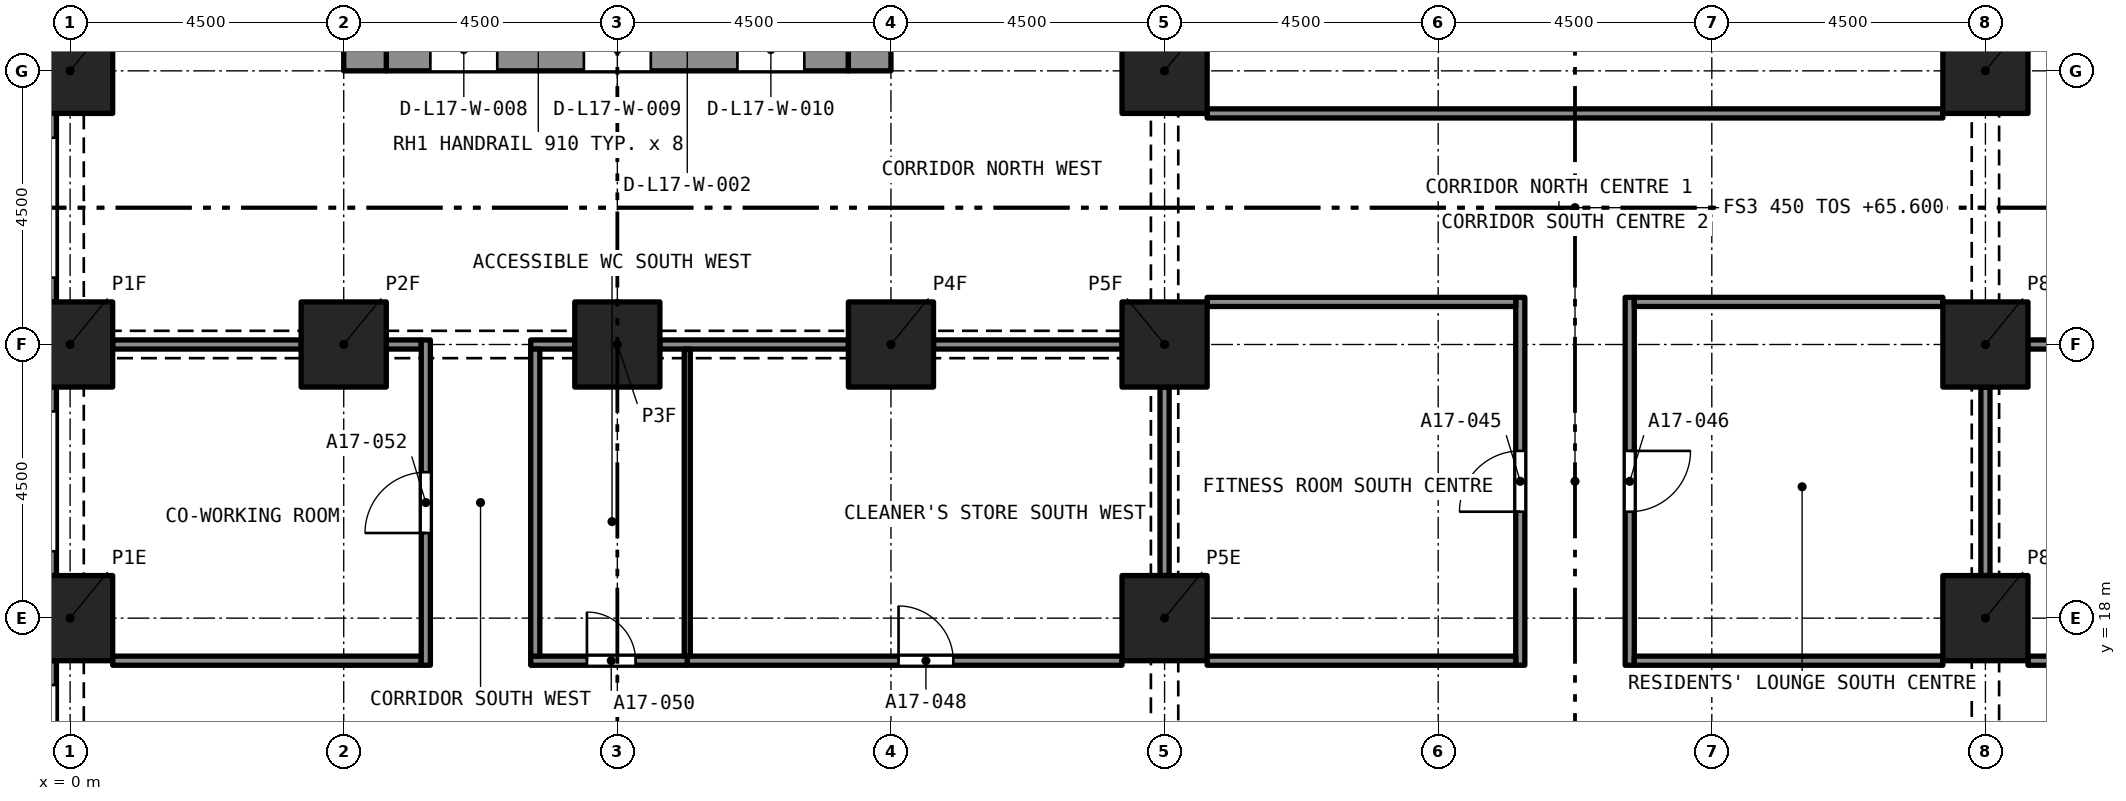
"""IFC4 building model, lengths in metres.
Left out: names, types, materials, properties, quantities, classifications, styles, units other than length and angle.
Written with IfcOpenShell. Run it as: python <this file> out.ifc"""

import sys

from ifc_helpers import new_model, si_unit, direction, frame, frame_2d, origin, origin_2d, place, context, subcontext, project, spatial, rectangle, extrude, element, fill, save


model = new_model("IFC4")
c1 = context("Model", 3, precision=1e-05, world=origin(), true_north=direction((0.0, 1.0)))
c2 = subcontext(c1, "Body", "Model", "MODEL_VIEW")
j1 = project(units=[si_unit("LENGTHUNIT", "METRE"), si_unit("PLANEANGLEUNIT", "RADIAN")], contexts=[c1])
p1 = place(None, origin())
s1 = spatial("IfcSite", under=j1, at=p1, CompositionType="ELEMENT")
p2 = place(p1, origin())
s2 = spatial("IfcBuilding", under=s1, at=p2, CompositionType="ELEMENT")
p3 = place(p2, frame((0.0, 0.0, 65.6)))
s3 = spatial("IfcBuildingStorey", under=s2, at=p3, CompositionType="ELEMENT", Elevation=65.6)
for number, where, z_axis, x_axis in (
    (1, (0.0, 18.0, 0.0), (0.0, 0.0, 1.0), (1.0, 0.0, 0.0)),
    (2, (18.0, 18.0, 0.0), (0.0, 0.0, 1.0), (1.0, 0.0, 0.0)),
    (3, (31.5, 18.0, 0.0), (0.0, 0.0, 1.0), (1.0, 0.0, 0.0)),
    (4, (0.0, 22.5, 0.0), (0.0, 0.0, 1.0), (1.0, 0.0, 0.0)),
    (5, (4.5, 22.5, 0.0), (0.0, 0.0, 1.0), (1.0, 0.0, 0.0)),
    (6, (9.0, 22.5, 0.0), (0.0, 0.0, 1.0), (1.0, 0.0, 0.0)),
    (7, (13.5, 22.5, 0.0), (0.0, 0.0, 1.0), (1.0, 0.0, 0.0)),
    (8, (18.0, 22.5, 0.0), (0.0, 0.0, 1.0), (1.0, 0.0, 0.0)),
    (9, (31.5, 22.5, 0.0), (0.0, 0.0, 1.0), (1.0, 0.0, 0.0)),
    (10, (0.0, 27.0, 0.0), (0.0, 0.0, 1.0), (1.0, 0.0, 0.0)),
    (11, (18.0, 27.0, 0.0), (0.0, 0.0, 1.0), (1.0, 0.0, 0.0)),
    (12, (31.5, 27.0, 0.0), (0.0, 0.0, 1.0), (1.0, 0.0, 0.0)),
):
    element("IfcColumn", number, at=place(p3, frame(where, z_axis=z_axis, x_axis=x_axis)), inside=s3, PredefinedType="COLUMN", context=c2, shape_type="SweptSolid", body=[
        extrude(rectangle(XDim=1.4, YDim=1.4, at=origin_2d()), origin(), (0.0, 0.0, 1.0), 3.2),
    ])
p4 = place(p3, frame((5.2, 27.35, 0.0), z_axis=(0.0, 0.0, 1.0), x_axis=(1.0, 0.0, 0.0)))
e13 = element("IfcWall", 13, at=p4, inside=s3, PredefinedType="SOLIDWALL", context=c2, shape_type="SweptSolid", body=[
    extrude(rectangle(XDim=7.6, YDim=0.7, at=frame_2d((3.8, 0.0))), origin(), (0.0, 0.0, 1.0), 3.2),
])
p5 = place(p4, frame((0.725, 0.0, 0.0)))
e14 = element("IfcOpeningElement", 14, at=p5, cuts=e13, PredefinedType="OPENING", context=c2, shape_type="SweptSolid", body=[
    extrude(rectangle(XDim=1.1, YDim=2.1, at=frame_2d((0.55, 1.05))), frame((0.0, 0.36, 0.0), z_axis=(0.0, -1.0, 0.0), x_axis=(1.0, 0.0, 0.0)), (0.0, 0.0, 1.0), 0.72),
])
p6 = place(p4, frame((3.25, 0.0, 0.0)))
e15 = element("IfcOpeningElement", 15, at=p6, cuts=e13, PredefinedType="OPENING", context=c2, shape_type="SweptSolid", body=[
    extrude(rectangle(XDim=1.1, YDim=2.1, at=frame_2d((0.55, 1.05))), frame((0.0, 0.36, 0.0), z_axis=(0.0, -1.0, 0.0), x_axis=(1.0, 0.0, 0.0)), (0.0, 0.0, 1.0), 0.72),
])
p7 = place(p4, frame((5.775, 0.0, 0.0)))
e16 = element("IfcOpeningElement", 16, at=p7, cuts=e13, PredefinedType="OPENING", context=c2, shape_type="SweptSolid", body=[
    extrude(rectangle(XDim=1.1, YDim=2.1, at=frame_2d((0.55, 1.05))), frame((0.0, 0.36, 0.0), z_axis=(0.0, -1.0, 0.0), x_axis=(1.0, 0.0, 0.0)), (0.0, 0.0, 1.0), 0.72),
])
p8 = place(p3, frame((4.85, 27.0, 0.0), z_axis=(0.0, 0.0, 1.0), x_axis=(0.0, 1.0, 0.0)))
e17 = element("IfcWall", 17, at=p8, inside=s3, PredefinedType="SOLIDWALL", context=c2, shape_type="SweptSolid", body=[
    extrude(rectangle(XDim=13.5, YDim=0.7, at=frame_2d((6.75, 0.0))), origin(), (0.0, 0.0, 1.0), 3.2),
])
p9 = place(p8, frame((8.95, 0.0, 0.0)))
e18 = element("IfcOpeningElement", 18, at=p9, cuts=e17, PredefinedType="OPENING", context=c2, shape_type="SweptSolid", body=[
    extrude(rectangle(XDim=1.2, YDim=2.1, at=frame_2d((0.6, 1.05))), frame((0.0, 0.36, 0.0), z_axis=(0.0, -1.0, 0.0), x_axis=(1.0, 0.0, 0.0)), (0.0, 0.0, 1.0), 0.72),
])
p10 = place(p3, frame((13.15, 27.0, 0.0), z_axis=(0.0, 0.0, 1.0), x_axis=(0.0, 1.0, 0.0)))
e19 = element("IfcWall", 19, at=p10, inside=s3, PredefinedType="SOLIDWALL", context=c2, shape_type="SweptSolid", body=[
    extrude(rectangle(XDim=13.5, YDim=0.7, at=frame_2d((6.75, 0.0))), origin(), (0.0, 0.0, 1.0), 3.2),
])
p11 = place(p10, frame((11.1, 0.0, 0.0)))
e20 = element("IfcOpeningElement", 20, at=p11, cuts=e19, PredefinedType="OPENING", context=c2, shape_type="SweptSolid", body=[
    extrude(rectangle(XDim=1.1, YDim=2.1, at=frame_2d((0.55, 1.05))), frame((0.0, 0.36, 0.0), z_axis=(0.0, -1.0, 0.0), x_axis=(1.0, 0.0, 0.0)), (0.0, 0.0, 1.0), 0.72),
])
p12 = place(p10, frame((8.95, 0.0, 0.0)))
e21 = element("IfcOpeningElement", 21, at=p12, cuts=e19, PredefinedType="OPENING", context=c2, shape_type="SweptSolid", body=[
    extrude(rectangle(XDim=1.2, YDim=2.1, at=frame_2d((0.6, 1.05))), frame((0.0, 0.36, 0.0), z_axis=(0.0, -1.0, 0.0), x_axis=(1.0, 0.0, 0.0)), (0.0, 0.0, 1.0), 0.72),
])
p13 = place(p3, frame((-0.375, 23.2, 0.0), z_axis=(0.0, 0.0, 1.0), x_axis=(0.0, 1.0, 0.0)))
e22 = element("IfcWall", 22, at=p13, inside=s3, PredefinedType="SOLIDWALL", context=c2, shape_type="SweptSolid", body=[
    extrude(rectangle(XDim=3.1, YDim=0.3, at=frame_2d((1.55, 0.0))), origin(), (0.0, 0.0, 1.0), 3.2),
])
p14 = place(p13, frame((0.4, 0.0, 0.45)))
e23 = element("IfcOpeningElement", 23, at=p14, cuts=e22, PredefinedType="OPENING", context=c2, shape_type="SweptSolid", body=[
    extrude(rectangle(XDim=2.3, YDim=1.95, at=frame_2d((1.15, 0.975))), frame((0.0, 0.16, 0.0), z_axis=(0.0, -1.0, 0.0), x_axis=(1.0, 0.0, 0.0)), (0.0, 0.0, 1.0), 0.32),
])
p15 = place(p3, frame((-0.375, 18.7, 0.0), z_axis=(0.0, 0.0, 1.0), x_axis=(0.0, 1.0, 0.0)))
e24 = element("IfcWall", 24, at=p15, inside=s3, PredefinedType="SOLIDWALL", context=c2, shape_type="SweptSolid", body=[
    extrude(rectangle(XDim=3.1, YDim=0.3, at=frame_2d((1.55, 0.0))), origin(), (0.0, 0.0, 1.0), 3.2),
])
p16 = place(p15, frame((0.4, 0.0, 0.45)))
e25 = element("IfcOpeningElement", 25, at=p16, cuts=e24, PredefinedType="OPENING", context=c2, shape_type="SweptSolid", body=[
    extrude(rectangle(XDim=2.3, YDim=1.95, at=frame_2d((1.15, 0.975))), frame((0.0, 0.16, 0.0), z_axis=(0.0, -1.0, 0.0), x_axis=(1.0, 0.0, 0.0)), (0.0, 0.0, 1.0), 0.32),
])
p17 = place(p3, frame((-0.375, 14.2, 0.0), z_axis=(0.0, 0.0, 1.0), x_axis=(0.0, 1.0, 0.0)))
e26 = element("IfcWall", 26, at=p17, inside=s3, PredefinedType="SOLIDWALL", context=c2, shape_type="SweptSolid", body=[
    extrude(rectangle(XDim=3.1, YDim=0.3, at=frame_2d((1.55, 0.0))), origin(), (0.0, 0.0, 1.0), 3.2),
])
p18 = place(p17, frame((0.4, 0.0, 0.45)))
e27 = element("IfcOpeningElement", 27, at=p18, cuts=e26, PredefinedType="OPENING", context=c2, shape_type="SweptSolid", body=[
    extrude(rectangle(XDim=2.3, YDim=1.95, at=frame_2d((1.15, 0.975))), frame((0.0, 0.16, 0.0), z_axis=(0.0, -1.0, 0.0), x_axis=(1.0, 0.0, 0.0)), (0.0, 0.0, 1.0), 0.32),
])
p19 = place(p3, frame((23.85, 17.225, 0.0), z_axis=(0.0, 0.0, 1.0), x_axis=(0.0, 1.0, 0.0)))
e28 = element("IfcWall", 28, at=p19, inside=s3, PredefinedType="PARTITIONING", context=c2, shape_type="SweptSolid", body=[
    extrude(rectangle(XDim=6.05, YDim=0.15, at=frame_2d((3.025, 0.0))), origin(), (0.0, 0.0, 1.0), 2.75),
])
p20 = place(p19, frame((2.525, 0.0, 0.0)))
e29 = element("IfcOpeningElement", 29, at=p20, cuts=e28, PredefinedType="OPENING", context=c2, shape_type="SweptSolid", body=[
    extrude(rectangle(XDim=1.0, YDim=2.1, at=frame_2d((0.5, 1.05))), frame((0.0, 0.085, 0.0), z_axis=(0.0, -1.0, 0.0), x_axis=(1.0, 0.0, 0.0)), (0.0, 0.0, 1.0), 0.17),
])
p21 = place(p3, frame((25.65, 23.275, 0.0), z_axis=(0.0, 0.0, 1.0), x_axis=(0.0, -1.0, 0.0)))
e30 = element("IfcWall", 30, at=p21, inside=s3, PredefinedType="PARTITIONING", context=c2, shape_type="SweptSolid", body=[
    extrude(rectangle(XDim=6.05, YDim=0.15, at=frame_2d((3.025, 0.0))), origin(), (0.0, 0.0, 1.0), 2.75),
])
p22 = place(p21, frame((2.525, 0.0, 0.0)))
e31 = element("IfcOpeningElement", 31, at=p22, cuts=e30, PredefinedType="OPENING", context=c2, shape_type="SweptSolid", body=[
    extrude(rectangle(XDim=1.0, YDim=2.1, at=frame_2d((0.5, 1.05))), frame((0.0, 0.085, 0.0), z_axis=(0.0, -1.0, 0.0), x_axis=(1.0, 0.0, 0.0)), (0.0, 0.0, 1.0), 0.17),
])
for number, where, z_axis, x_axis in (
    (32, (18.7, 17.3, 0.0), (0.0, 0.0, 1.0), (1.0, 0.0, 0.0)),
    (33, (25.725, 17.3, 0.0), (0.0, 0.0, 1.0), (1.0, 0.0, 0.0)),
):
    element("IfcWall", number, at=place(p3, frame(where, z_axis=z_axis, x_axis=x_axis)), inside=s3, PredefinedType="PARTITIONING", context=c2, shape_type="SweptSolid", body=[
        extrude(rectangle(XDim=5.075, YDim=0.15, at=frame_2d((2.538, 0.0))), origin(), (0.0, 0.0, 1.0), 2.75),
    ])
p23 = place(p3, frame((32.2, 17.3, 0.0), z_axis=(0.0, 0.0, 1.0), x_axis=(1.0, 0.0, 0.0)))
e34 = element("IfcWall", 34, at=p23, inside=s3, PredefinedType="PARTITIONING", context=c2, shape_type="SweptSolid", body=[
    extrude(rectangle(XDim=7.15, YDim=0.15, at=frame_2d((3.575, 0.0))), origin(), (0.0, 0.0, 1.0), 2.9),
])
p24 = place(p23, frame((2.775, 0.0, 0.0)))
e35 = element("IfcOpeningElement", 35, at=p24, cuts=e34, PredefinedType="OPENING", context=c2, shape_type="SweptSolid", body=[
    extrude(rectangle(XDim=0.9, YDim=2.1, at=frame_2d((0.45, 1.05))), frame((0.0, 0.085, 0.0), z_axis=(0.0, -1.0, 0.0), x_axis=(1.0, 0.0, 0.0)), (0.0, 0.0, 1.0), 0.17),
])
p25 = place(p3, frame((10.15, 17.3, 0.0), z_axis=(0.0, 0.0, 1.0), x_axis=(1.0, 0.0, 0.0)))
e36 = element("IfcWall", 36, at=p25, inside=s3, PredefinedType="PARTITIONING", context=c2, shape_type="SweptSolid", body=[
    extrude(rectangle(XDim=7.15, YDim=0.15, at=frame_2d((3.575, 0.0))), origin(), (0.0, 0.0, 1.0), 2.9),
])
p26 = place(p25, frame((3.475, 0.0, 0.0)))
e37 = element("IfcOpeningElement", 37, at=p26, cuts=e36, PredefinedType="OPENING", context=c2, shape_type="SweptSolid", body=[
    extrude(rectangle(XDim=0.9, YDim=2.1, at=frame_2d((0.45, 1.05))), frame((0.0, 0.085, 0.0), z_axis=(0.0, -1.0, 0.0), x_axis=(1.0, 0.0, 0.0)), (0.0, 0.0, 1.0), 0.17),
])
p27 = place(p3, frame((7.575, 17.3, 0.0), z_axis=(0.0, 0.0, 1.0), x_axis=(1.0, 0.0, 0.0)))
e38 = element("IfcWall", 38, at=p27, inside=s3, PredefinedType="PARTITIONING", context=c2, shape_type="SweptSolid", body=[
    extrude(rectangle(XDim=2.575, YDim=0.15, at=frame_2d((1.288, 0.0))), origin(), (0.0, 0.0, 1.0), 2.9),
])
p28 = place(p27, frame((0.925, 0.0, 0.0)))
e39 = element("IfcOpeningElement", 39, at=p28, cuts=e38, PredefinedType="OPENING", context=c2, shape_type="SweptSolid", body=[
    extrude(rectangle(XDim=0.8, YDim=2.1, at=frame_2d((0.4, 1.05))), frame((0.0, 0.085, 0.0), z_axis=(0.0, -1.0, 0.0), x_axis=(1.0, 0.0, 0.0)), (0.0, 0.0, 1.0), 0.17),
])
p29 = place(p3, frame((0.7, 17.3, 0.0), z_axis=(0.0, 0.0, 1.0), x_axis=(1.0, 0.0, 0.0)))
e40 = element("IfcWall", 40, at=p29, inside=s3, PredefinedType="PARTITIONING", context=c2, shape_type="SweptSolid", body=[
    extrude(rectangle(XDim=5.075, YDim=0.15, at=frame_2d((2.538, 0.0))), origin(), (0.0, 0.0, 1.0), 2.9),
])
p30 = place(p3, frame((18.7, 26.3, 0.0), z_axis=(0.0, 0.0, 1.0), x_axis=(1.0, 0.0, 0.0)))
e41 = element("IfcWall", 41, at=p30, inside=s3, PredefinedType="PARTITIONING", context=c2, shape_type="SweptSolid", body=[
    extrude(rectangle(XDim=12.1, YDim=0.15, at=frame_2d((6.05, 0.0))), origin(), (0.0, 0.0, 1.0), 2.75),
])
p31 = place(p3, frame((18.7, 23.2, 0.0), z_axis=(0.0, 0.0, 1.0), x_axis=(1.0, 0.0, 0.0)))
e42 = element("IfcWall", 42, at=p31, inside=s3, PredefinedType="PARTITIONING", context=c2, shape_type="SweptSolid", body=[
    extrude(rectangle(XDim=5.075, YDim=0.15, at=frame_2d((2.538, 0.0))), origin(), (0.0, 0.0, 1.0), 2.75),
])
p32 = place(p3, frame((18.0, 18.7, 0.0), z_axis=(0.0, 0.0, 1.0), x_axis=(0.0, 1.0, 0.0)))
e43 = element("IfcWall", 43, at=p32, inside=s3, PredefinedType="PARTITIONING", context=c2, shape_type="SweptSolid", body=[
    extrude(rectangle(XDim=3.1, YDim=0.15, at=frame_2d((1.55, 0.0))), origin(), (0.0, 0.0, 1.0), 2.38),
])
p33 = place(p3, frame((25.725, 23.2, 0.0), z_axis=(0.0, 0.0, 1.0), x_axis=(1.0, 0.0, 0.0)))
e44 = element("IfcWall", 44, at=p33, inside=s3, PredefinedType="PARTITIONING", context=c2, shape_type="SweptSolid", body=[
    extrude(rectangle(XDim=5.075, YDim=0.15, at=frame_2d((2.538, 0.0))), origin(), (0.0, 0.0, 1.0), 2.75),
])
p34 = place(p3, frame((31.5, 18.7, 0.0), z_axis=(0.0, 0.0, 1.0), x_axis=(0.0, 1.0, 0.0)))
e45 = element("IfcWall", 45, at=p34, inside=s3, PredefinedType="PARTITIONING", context=c2, shape_type="SweptSolid", body=[
    extrude(rectangle(XDim=3.1, YDim=0.15, at=frame_2d((1.55, 0.0))), origin(), (0.0, 0.0, 1.0), 2.38),
])
p35 = place(p3, frame((32.2, 22.5, 0.0), z_axis=(0.0, 0.0, 1.0), x_axis=(1.0, 0.0, 0.0)))
e46 = element("IfcWall", 46, at=p35, inside=s3, PredefinedType="PARTITIONING", context=c2, shape_type="SweptSolid", body=[
    extrude(rectangle(XDim=9.725, YDim=0.15, at=frame_2d((4.863, 0.0))), origin(), (0.0, 0.0, 1.0), 2.9),
])
for number, where, z_axis, x_axis in (
    (47, (14.2, 22.5, 0.0), (0.0, 0.0, 1.0), (1.0, 0.0, 0.0)),
    (48, (9.7, 22.5, 0.0), (0.0, 0.0, 1.0), (1.0, 0.0, 0.0)),
):
    element("IfcWall", number, at=place(p3, frame(where, z_axis=z_axis, x_axis=x_axis)), inside=s3, PredefinedType="PARTITIONING", context=c2, shape_type="SweptSolid", body=[
        extrude(rectangle(XDim=3.1, YDim=0.15, at=frame_2d((1.55, 0.0))), origin(), (0.0, 0.0, 1.0), 2.38),
    ])
p36 = place(p3, frame((7.575, 22.5, 0.0), z_axis=(0.0, 0.0, 1.0), x_axis=(1.0, 0.0, 0.0)))
e49 = element("IfcWall", 49, at=p36, inside=s3, PredefinedType="PARTITIONING", context=c2, shape_type="SweptSolid", body=[
    extrude(rectangle(XDim=0.725, YDim=0.15, at=frame_2d((0.363, 0.0))), origin(), (0.0, 0.0, 1.0), 2.38),
])
p37 = place(p3, frame((5.2, 22.5, 0.0), z_axis=(0.0, 0.0, 1.0), x_axis=(1.0, 0.0, 0.0)))
e50 = element("IfcWall", 50, at=p37, inside=s3, PredefinedType="PARTITIONING", context=c2, shape_type="SweptSolid", body=[
    extrude(rectangle(XDim=0.575, YDim=0.15, at=frame_2d((0.288, 0.0))), origin(), (0.0, 0.0, 1.0), 2.38),
])
p38 = place(p3, frame((0.7, 22.5, 0.0), z_axis=(0.0, 0.0, 1.0), x_axis=(1.0, 0.0, 0.0)))
e51 = element("IfcWall", 51, at=p38, inside=s3, PredefinedType="PARTITIONING", context=c2, shape_type="SweptSolid", body=[
    extrude(rectangle(XDim=3.1, YDim=0.15, at=frame_2d((1.55, 0.0))), origin(), (0.0, 0.0, 1.0), 2.38),
])
p39 = place(p3, frame((7.65, 17.375, 0.0), z_axis=(0.0, 0.0, 1.0), x_axis=(0.0, 1.0, 0.0)))
e52 = element("IfcWall", 52, at=p39, inside=s3, PredefinedType="PARTITIONING", context=c2, shape_type="SweptSolid", body=[
    extrude(rectangle(XDim=5.05, YDim=0.15, at=frame_2d((2.525, 0.0))), origin(), (0.0, 0.0, 1.0), 2.9),
])
p40 = place(p3, frame((5.85, 17.225, 0.0), z_axis=(0.0, 0.0, 1.0), x_axis=(0.0, 1.0, 0.0)))
e53 = element("IfcWall", 53, at=p40, inside=s3, PredefinedType="PARTITIONING", context=c2, shape_type="SweptSolid", body=[
    extrude(rectangle(XDim=5.35, YDim=0.15, at=frame_2d((2.675, 0.0))), origin(), (0.0, 0.0, 1.0), 2.9),
])
p41 = place(p40, frame((2.175, 0.0, 0.0)))
e54 = element("IfcOpeningElement", 54, at=p41, cuts=e53, PredefinedType="OPENING", context=c2, shape_type="SweptSolid", body=[
    extrude(rectangle(XDim=1.0, YDim=2.1, at=frame_2d((0.5, 1.05))), frame((0.0, 0.085, 0.0), z_axis=(0.0, -1.0, 0.0), x_axis=(1.0, 0.0, 0.0)), (0.0, 0.0, 1.0), 0.17),
])
p42 = place(p3, frame((10.15, 17.375, 0.0), z_axis=(0.0, 0.0, 1.0), x_axis=(0.0, 1.0, 0.0)))
e55 = element("IfcWall", 55, at=p42, inside=s3, PredefinedType="PARTITIONING", context=c2, shape_type="SweptSolid", body=[
    extrude(rectangle(XDim=5.05, YDim=0.1, at=frame_2d((2.525, 0.0))), origin(), (0.0, 0.0, 1.0), 2.9),
])
p43 = place(p20, origin())
e56 = element("IfcDoor", 56, at=p43, inside=s3, OperationType="SINGLE_SWING_RIGHT", PredefinedType="DOOR", context=c2, shape_type="SweptSolid", body=[
    extrude(rectangle(XDim=1.0, YDim=2.1, at=frame_2d((0.5, 1.05))), frame((0.0, 0.025, 0.0), z_axis=(0.0, -1.0, 0.0), x_axis=(1.0, 0.0, 0.0)), (0.0, 0.0, 1.0), 0.05),
])
fill(e29, e56)
p44 = place(p22, origin())
e57 = element("IfcDoor", 57, at=p44, inside=s3, OperationType="SINGLE_SWING_RIGHT", PredefinedType="DOOR", context=c2, shape_type="SweptSolid", body=[
    extrude(rectangle(XDim=1.0, YDim=2.1, at=frame_2d((0.5, 1.05))), frame((0.0, 0.025, 0.0), z_axis=(0.0, -1.0, 0.0), x_axis=(1.0, 0.0, 0.0)), (0.0, 0.0, 1.0), 0.05),
])
fill(e31, e57)
p45 = place(p26, origin())
e58 = element("IfcDoor", 58, at=p45, inside=s3, OperationType="SINGLE_SWING_RIGHT", PredefinedType="DOOR", context=c2, shape_type="SweptSolid", body=[
    extrude(rectangle(XDim=0.9, YDim=2.1, at=frame_2d((0.45, 1.05))), frame((0.0, 0.025, 0.0), z_axis=(0.0, -1.0, 0.0), x_axis=(1.0, 0.0, 0.0)), (0.0, 0.0, 1.0), 0.05),
])
fill(e37, e58)
p46 = place(p28, origin())
e59 = element("IfcDoor", 59, at=p46, inside=s3, OperationType="SINGLE_SWING_RIGHT", PredefinedType="DOOR", context=c2, shape_type="SweptSolid", body=[
    extrude(rectangle(XDim=0.8, YDim=2.1, at=frame_2d((0.4, 1.05))), frame((0.0, 0.025, 0.0), z_axis=(0.0, -1.0, 0.0), x_axis=(1.0, 0.0, 0.0)), (0.0, 0.0, 1.0), 0.05),
])
fill(e39, e59)
p47 = place(p41, origin())
e60 = element("IfcDoor", 60, at=p47, inside=s3, OperationType="SINGLE_SWING_LEFT", PredefinedType="DOOR", context=c2, shape_type="SweptSolid", body=[
    extrude(rectangle(XDim=1.0, YDim=2.1, at=frame_2d((0.5, 1.05))), frame((0.0, 0.025, 0.0), z_axis=(0.0, -1.0, 0.0), x_axis=(1.0, 0.0, 0.0)), (0.0, 0.0, 1.0), 0.05),
])
fill(e54, e60)
save(model, sys.argv[1])
